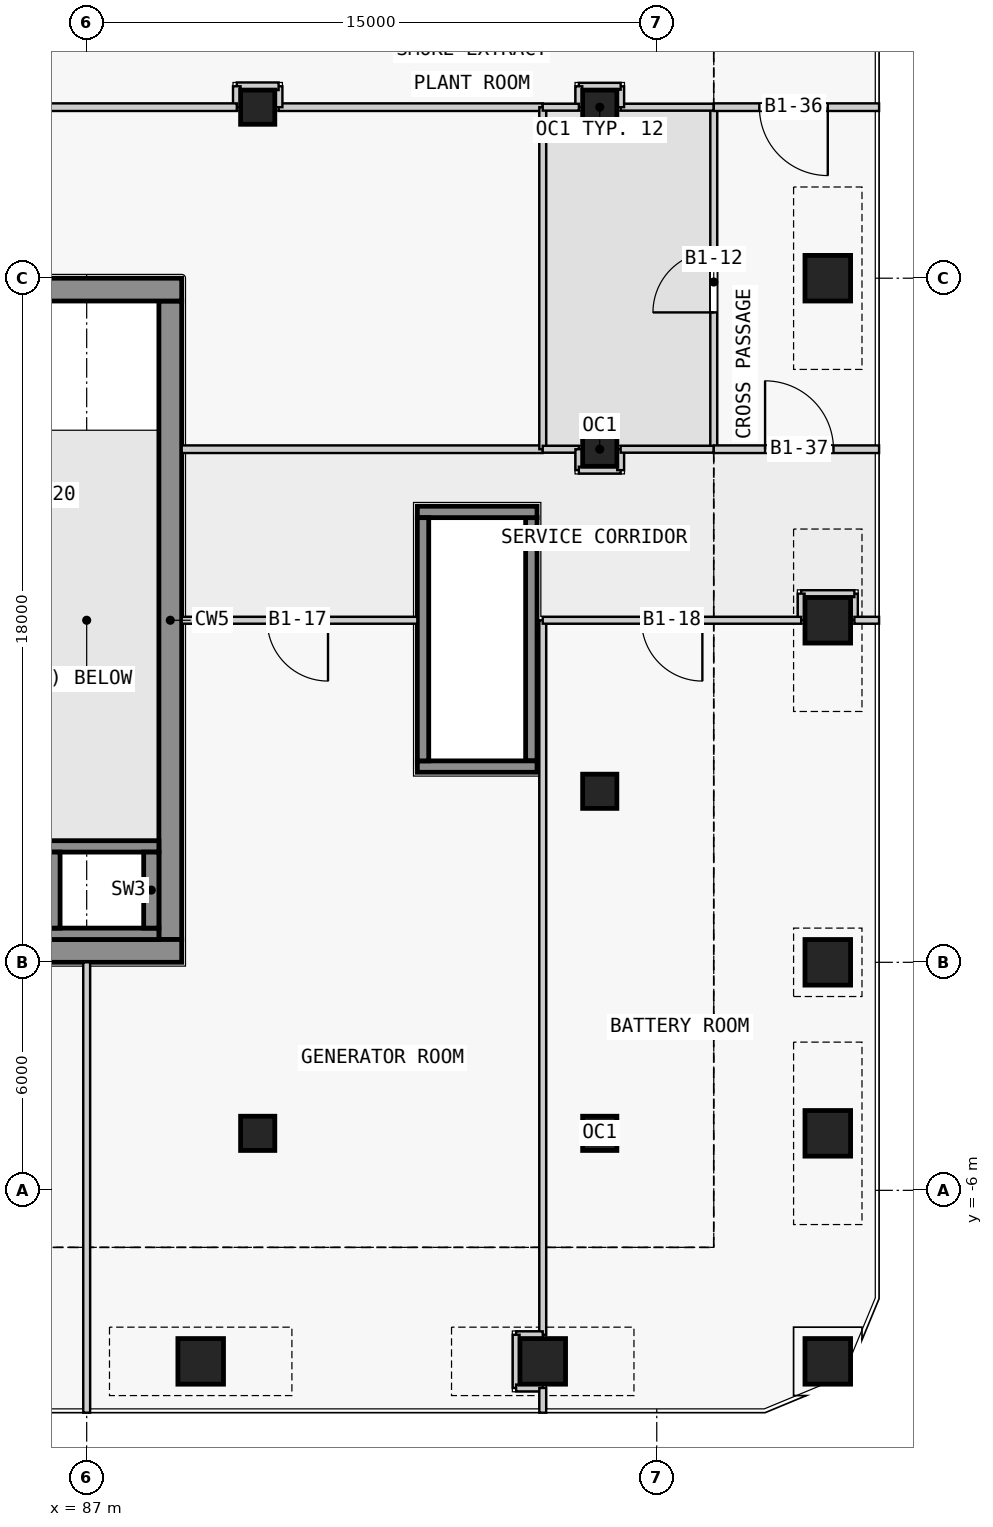
"""IFC4 building model, lengths in metres.
Left out: names, types, materials, properties, quantities, classifications, styles, units other than length and angle.
Written with IfcOpenShell. Run it as: python <this file> out.ifc"""

import sys

from ifc_helpers import new_model, si_unit, direction, frame, frame_2d, origin, origin_2d, place, context, subcontext, project, spatial, rectangle, extrude, element, fill, save


model = new_model("IFC4")
c1 = context("Model", 3, precision=1e-05, world=origin(), true_north=direction((0.0, 1.0)))
c2 = subcontext(c1, "Body", "Model", "MODEL_VIEW")
j1 = project(units=[si_unit("LENGTHUNIT", "METRE"), si_unit("PLANEANGLEUNIT", "RADIAN")], contexts=[c1])
p1 = place(None, origin())
s1 = spatial("IfcSite", under=j1, at=p1, CompositionType="ELEMENT")
p2 = place(p1, origin())
s2 = spatial("IfcBuilding", under=s1, at=p2, CompositionType="ELEMENT")
p3 = place(p2, frame((0.0, 0.0, -7.0)))
s3 = spatial("IfcBuildingStorey", under=s2, at=p3, CompositionType="ELEMENT", Elevation=-7.0)
for number, where, z_axis, x_axis in (
    (1, (90.0, -10.5, 0.0), (0.0, 0.0, 1.0), (1.0, 0.0, 0.0)),
    (2, (99.0, -10.5, 0.0), (0.0, 0.0, 1.0), (1.0, 0.0, 0.0)),
    (3, (106.5, -10.5, 0.0), (0.0, 0.0, 1.0), (1.0, 0.0, 0.0)),
    (4, (106.5, -4.5, 0.0), (0.0, 0.0, 1.0), (1.0, 0.0, 0.0)),
    (5, (106.5, 0.0, 0.0), (0.0, 0.0, 1.0), (1.0, 0.0, 0.0)),
    (6, (106.5, 9.0, 0.0), (0.0, 0.0, 1.0), (1.0, 0.0, 0.0)),
    (7, (106.5, 18.0, 0.0), (0.0, 0.0, 1.0), (1.0, 0.0, 0.0)),
):
    element("IfcColumn", number, at=place(p3, frame(where, z_axis=z_axis, x_axis=x_axis)), inside=s3, PredefinedType="COLUMN", context=c2, shape_type="SweptSolid", body=[
        extrude(rectangle(XDim=1.2, YDim=1.2, at=origin_2d()), origin(), (0.0, 0.0, 1.0), 7.0),
    ])
for number, where, z_axis, x_axis in (
    (8, (91.5, -4.5, 0.0), (0.0, 0.0, 1.0), (1.0, 0.0, 0.0)),
    (9, (100.5, -4.5, 0.0), (0.0, 0.0, 1.0), (1.0, 0.0, 0.0)),
    (10, (100.5, 4.5, 0.0), (0.0, 0.0, 1.0), (1.0, 0.0, 0.0)),
    (11, (100.5, 13.5, 0.0), (0.0, 0.0, 1.0), (1.0, 0.0, 0.0)),
    (12, (100.5, 22.5, 0.0), (0.0, 0.0, 1.0), (1.0, 0.0, 0.0)),
    (13, (91.5, 22.5, 0.0), (0.0, 0.0, 1.0), (1.0, 0.0, 0.0)),
):
    element("IfcColumn", number, at=place(p3, frame(where, z_axis=z_axis, x_axis=x_axis)), inside=s3, PredefinedType="COLUMN", context=c2, shape_type="SweptSolid", body=[
        extrude(rectangle(XDim=0.9, YDim=0.9, at=origin_2d()), origin(), (0.0, 0.0, 1.0), 7.0),
    ])
for number, where, z_axis, x_axis in (
    (14, (75.0, 0.3, 0.0), (0.0, 0.0, 1.0), (1.0, 0.0, 0.0)),
    (15, (75.0, 17.7, 0.0), (0.0, 0.0, 1.0), (1.0, 0.0, 0.0)),
):
    element("IfcWall", number, at=place(p3, frame(where, z_axis=z_axis, x_axis=x_axis)), inside=s3, PredefinedType="SHEAR", context=c2, shape_type="SweptSolid", body=[
        extrude(rectangle(XDim=14.5, YDim=0.6, at=frame_2d((7.25, 0.0))), origin(), (0.0, 0.0, 1.0), 6.55),
    ])
p4 = place(p3, frame((89.2, 0.6, 0.0), z_axis=(0.0, 0.0, 1.0), x_axis=(0.0, 1.0, 0.0)))
e16 = element("IfcWall", 16, at=p4, inside=s3, PredefinedType="SHEAR", context=c2, shape_type="SweptSolid", body=[
    extrude(rectangle(XDim=16.8, YDim=0.6, at=frame_2d((8.4, 0.0))), origin(), (0.0, 0.0, 1.0), 6.55),
])
p5 = place(p3, frame((81.3, 0.75, 0.0), z_axis=(0.0, 0.0, 1.0), x_axis=(1.0, 0.0, 0.0)))
e17 = element("IfcWall", 17, at=p5, inside=s3, PredefinedType="SHEAR", context=c2, shape_type="SweptSolid", body=[
    extrude(rectangle(XDim=7.6, YDim=0.3, at=frame_2d((3.8, 0.0))), origin(), (0.0, 0.0, 1.0), 6.55),
])
p6 = place(p3, frame((86.15, 0.9, 0.0), z_axis=(0.0, 0.0, 1.0), x_axis=(0.0, 1.0, 0.0)))
e18 = element("IfcWall", 18, at=p6, inside=s3, PredefinedType="SHEAR", context=c2, shape_type="SweptSolid", body=[
    extrude(rectangle(XDim=2.0, YDim=0.3, at=frame_2d((1.0, 0.0))), origin(), (0.0, 0.0, 1.0), 6.55),
])
p7 = place(p3, frame((88.7, 0.9, 0.0), z_axis=(0.0, 0.0, 1.0), x_axis=(0.0, 1.0, 0.0)))
e19 = element("IfcWall", 19, at=p7, inside=s3, PredefinedType="SHEAR", context=c2, shape_type="SweptSolid", body=[
    extrude(rectangle(XDim=2.0, YDim=0.4, at=frame_2d((1.0, 0.0))), origin(), (0.0, 0.0, 1.0), 6.55),
])
p8 = place(p3, frame((81.3, 3.05, 0.0), z_axis=(0.0, 0.0, 1.0), x_axis=(1.0, 0.0, 0.0)))
e20 = element("IfcWall", 20, at=p8, inside=s3, PredefinedType="SHEAR", context=c2, shape_type="SweptSolid", body=[
    extrude(rectangle(XDim=7.6, YDim=0.3, at=frame_2d((3.8, 0.0))), origin(), (0.0, 0.0, 1.0), 6.55),
])
for number, where, z_axis, x_axis in (
    (21, (95.85, 5.3, 0.0), (0.0, 0.0, 1.0), (0.0, 1.0, 0.0)),
    (22, (98.7, 5.3, 0.0), (0.0, 0.0, 1.0), (0.0, 1.0, 0.0)),
):
    element("IfcWall", number, at=place(p3, frame(where, z_axis=z_axis, x_axis=x_axis)), inside=s3, PredefinedType="SHEAR", context=c2, shape_type="SweptSolid", body=[
        extrude(rectangle(XDim=6.4, YDim=0.3, at=frame_2d((3.2, 0.0))), origin(), (0.0, 0.0, 1.0), 6.55),
    ])
for number, where, z_axis, x_axis in (
    (23, (95.7, 5.15, 0.0), (0.0, 0.0, 1.0), (1.0, 0.0, 0.0)),
    (24, (95.7, 11.85, 0.0), (0.0, 0.0, 1.0), (1.0, 0.0, 0.0)),
):
    element("IfcWall", number, at=place(p3, frame(where, z_axis=z_axis, x_axis=x_axis)), inside=s3, PredefinedType="SHEAR", context=c2, shape_type="SweptSolid", body=[
        extrude(rectangle(XDim=3.15, YDim=0.3, at=frame_2d((1.575, 0.0))), origin(), (0.0, 0.0, 1.0), 6.55),
    ])
p9 = place(p3, frame((99.0, 9.0, 0.0), z_axis=(0.0, 0.0, 1.0), x_axis=(0.0, -1.0, 0.0)))
e25 = element("IfcWall", 25, at=p9, inside=s3, PredefinedType="PARTITIONING", context=c2, shape_type="SweptSolid", body=[
    extrude(rectangle(XDim=18.8, YDim=0.18, at=frame_2d((9.4, 0.0))), origin(), (0.0, 0.0, 1.0), 6.55),
])
p10 = place(p3, frame((99.0, -9.8, 0.0), z_axis=(0.0, 0.0, 1.0), x_axis=(-1.0, 0.0, 0.0)))
e26 = element("IfcWall", 26, at=p10, inside=s3, PredefinedType="PARTITIONING", context=c2, shape_type="SweptSolid", body=[
    extrude(rectangle(XDim=0.7, YDim=0.18, at=frame_2d((0.35, 0.0))), origin(), (0.0, 0.0, 1.0), 6.55),
])
p11 = place(p3, frame((98.3, -9.8, 0.0), z_axis=(0.0, 0.0, 1.0), x_axis=(0.0, -1.0, 0.0)))
e27 = element("IfcWall", 27, at=p11, inside=s3, PredefinedType="PARTITIONING", context=c2, shape_type="SweptSolid", body=[
    extrude(rectangle(XDim=1.4, YDim=0.18, at=frame_2d((0.7, 0.0))), origin(), (0.0, 0.0, 1.0), 6.55),
])
p12 = place(p3, frame((98.3, -11.2, 0.0), z_axis=(0.0, 0.0, 1.0), x_axis=(1.0, 0.0, 0.0)))
e28 = element("IfcWall", 28, at=p12, inside=s3, PredefinedType="PARTITIONING", context=c2, shape_type="SweptSolid", body=[
    extrude(rectangle(XDim=0.7, YDim=0.18, at=frame_2d((0.35, 0.0))), origin(), (0.0, 0.0, 1.0), 6.55),
])
p13 = place(p3, frame((99.0, -11.2, 0.0), z_axis=(0.0, 0.0, 1.0), x_axis=(0.0, -1.0, 0.0)))
e29 = element("IfcWall", 29, at=p13, inside=s3, PredefinedType="PARTITIONING", context=c2, shape_type="SweptSolid", body=[
    extrude(rectangle(XDim=0.65, YDim=0.18, at=frame_2d((0.325, 0.0))), origin(), (0.0, 0.0, 1.0), 6.55),
])
p14 = place(p3, frame((99.0, 22.5, 0.0), z_axis=(0.0, 0.0, 1.0), x_axis=(-1.0, 0.0, 0.0)))
e30 = element("IfcWall", 30, at=p14, inside=s3, PredefinedType="PARTITIONING", context=c2, shape_type="SweptSolid", body=[
    extrude(rectangle(XDim=6.95, YDim=0.2, at=frame_2d((3.475, 0.0))), origin(), (0.0, 0.0, 1.0), 6.55),
])
p15 = place(p3, frame((92.05, 22.5, 0.0), z_axis=(0.0, 0.0, 1.0), x_axis=(0.0, 1.0, 0.0)))
e31 = element("IfcWall", 31, at=p15, inside=s3, PredefinedType="PARTITIONING", context=c2, shape_type="SweptSolid", body=[
    extrude(rectangle(XDim=0.55, YDim=0.2, at=frame_2d((0.275, 0.0))), origin(), (0.0, 0.0, 1.0), 6.55),
])
p16 = place(p3, frame((92.05, 23.05, 0.0), z_axis=(0.0, 0.0, 1.0), x_axis=(-1.0, 0.0, 0.0)))
e32 = element("IfcWall", 32, at=p16, inside=s3, PredefinedType="PARTITIONING", context=c2, shape_type="SweptSolid", body=[
    extrude(rectangle(XDim=1.1, YDim=0.2, at=frame_2d((0.55, 0.0))), origin(), (0.0, 0.0, 1.0), 6.55),
])
p17 = place(p3, frame((90.95, 23.05, 0.0), z_axis=(0.0, 0.0, 1.0), x_axis=(0.0, -1.0, 0.0)))
e33 = element("IfcWall", 33, at=p17, inside=s3, PredefinedType="PARTITIONING", context=c2, shape_type="SweptSolid", body=[
    extrude(rectangle(XDim=0.55, YDim=0.2, at=frame_2d((0.275, 0.0))), origin(), (0.0, 0.0, 1.0), 6.55),
])
p18 = place(p3, frame((90.95, 22.5, 0.0), z_axis=(0.0, 0.0, 1.0), x_axis=(-1.0, 0.0, 0.0)))
e34 = element("IfcWall", 34, at=p18, inside=s3, PredefinedType="PARTITIONING", context=c2, shape_type="SweptSolid", body=[
    extrude(rectangle(XDim=7.9, YDim=0.2, at=frame_2d((3.95, 0.0))), origin(), (0.0, 0.0, 1.0), 6.55),
])
p19 = place(p3, frame((87.0, 0.0, 0.0), z_axis=(0.0, 0.0, 1.0), x_axis=(0.0, -1.0, 0.0)))
e35 = element("IfcWall", 35, at=p19, inside=s3, PredefinedType="PARTITIONING", context=c2, shape_type="SweptSolid", body=[
    extrude(rectangle(XDim=11.85, YDim=0.18, at=frame_2d((5.925, 0.0))), origin(), (0.0, 0.0, 1.0), 6.55),
])
p20 = place(p3, frame((107.2, 9.0, 0.0), z_axis=(0.0, 0.0, 1.0), x_axis=(0.0, 1.0, 0.0)))
e36 = element("IfcWall", 36, at=p20, inside=s3, PredefinedType="PARTITIONING", context=c2, shape_type="SweptSolid", body=[
    extrude(rectangle(XDim=0.7, YDim=0.18, at=frame_2d((0.35, 0.0))), origin(), (0.0, 0.0, 1.0), 6.55),
])
p21 = place(p3, frame((107.2, 9.7, 0.0), z_axis=(0.0, 0.0, 1.0), x_axis=(-1.0, 0.0, 0.0)))
e37 = element("IfcWall", 37, at=p21, inside=s3, PredefinedType="PARTITIONING", context=c2, shape_type="SweptSolid", body=[
    extrude(rectangle(XDim=1.4, YDim=0.18, at=frame_2d((0.7, 0.0))), origin(), (0.0, 0.0, 1.0), 6.55),
])
p22 = place(p3, frame((105.8, 9.7, 0.0), z_axis=(0.0, 0.0, 1.0), x_axis=(0.0, -1.0, 0.0)))
e38 = element("IfcWall", 38, at=p22, inside=s3, PredefinedType="PARTITIONING", context=c2, shape_type="SweptSolid", body=[
    extrude(rectangle(XDim=0.7, YDim=0.18, at=frame_2d((0.35, 0.0))), origin(), (0.0, 0.0, 1.0), 6.55),
])
p23 = place(p3, frame((105.8, 9.0, 0.0), z_axis=(0.0, 0.0, 1.0), x_axis=(-1.0, 0.0, 0.0)))
e39 = element("IfcWall", 39, at=p23, inside=s3, PredefinedType="PARTITIONING", context=c2, shape_type="SweptSolid", body=[
    extrude(rectangle(XDim=6.8, YDim=0.18, at=frame_2d((3.4, 0.0))), origin(), (0.0, 0.0, 1.0), 6.55),
])
p24 = place(p23, frame((2.6, 0.0, 0.0)))
e40 = element("IfcOpeningElement", 40, at=p24, cuts=e39, PredefinedType="OPENING", context=c2, shape_type="SweptSolid", body=[
    extrude(rectangle(XDim=1.6, YDim=2.4, at=frame_2d((0.8, 1.2))), frame((0.0, 0.1, 0.0), z_axis=(0.0, -1.0, 0.0), x_axis=(1.0, 0.0, 0.0)), (0.0, 0.0, 1.0), 0.2),
])
p25 = place(p3, frame((89.5, 13.5, 0.0), z_axis=(0.0, 0.0, 1.0), x_axis=(1.0, 0.0, 0.0)))
e41 = element("IfcWall", 41, at=p25, inside=s3, PredefinedType="PARTITIONING", context=c2, shape_type="SweptSolid", body=[
    extrude(rectangle(XDim=9.5, YDim=0.2, at=frame_2d((4.75, 0.0))), origin(), (0.0, 0.0, 1.0), 6.55),
])
p26 = place(p3, frame((103.5, 13.5, 0.0), z_axis=(0.0, 0.0, 1.0), x_axis=(0.0, 1.0, 0.0)))
e42 = element("IfcWall", 42, at=p26, inside=s3, PredefinedType="PARTITIONING", context=c2, shape_type="SweptSolid", body=[
    extrude(rectangle(XDim=9.0, YDim=0.18, at=frame_2d((4.5, 0.0))), origin(), (0.0, 0.0, 1.0), 6.55),
])
p27 = place(p26, frame((3.6, 0.0, 0.0)))
e43 = element("IfcOpeningElement", 43, at=p27, cuts=e42, PredefinedType="OPENING", context=c2, shape_type="SweptSolid", body=[
    extrude(rectangle(XDim=1.6, YDim=2.4, at=frame_2d((0.8, 1.2))), frame((0.0, 0.1, 0.0), z_axis=(0.0, -1.0, 0.0), x_axis=(1.0, 0.0, 0.0)), (0.0, 0.0, 1.0), 0.2),
])
p28 = place(p3, frame((99.0, 22.5, 0.0), z_axis=(0.0, 0.0, 1.0), x_axis=(0.0, -1.0, 0.0)))
e44 = element("IfcWall", 44, at=p28, inside=s3, PredefinedType="PARTITIONING", context=c2, shape_type="SweptSolid", body=[
    extrude(rectangle(XDim=9.0, YDim=0.18, at=frame_2d((4.5, 0.0))), origin(), (0.0, 0.0, 1.0), 6.55),
])
p29 = place(p3, frame((95.7, 9.0, 0.0), z_axis=(0.0, 0.0, 1.0), x_axis=(-1.0, 0.0, 0.0)))
e45 = element("IfcWall", 45, at=p29, inside=s3, PredefinedType="PARTITIONING", context=c2, shape_type="SweptSolid", body=[
    extrude(rectangle(XDim=6.2, YDim=0.18, at=frame_2d((3.1, 0.0))), origin(), (0.0, 0.0, 1.0), 6.55),
])
p30 = place(p29, frame((2.35, 0.0, 0.0)))
e46 = element("IfcOpeningElement", 46, at=p30, cuts=e45, PredefinedType="OPENING", context=c2, shape_type="SweptSolid", body=[
    extrude(rectangle(XDim=1.6, YDim=2.4, at=frame_2d((0.8, 1.2))), frame((0.0, 0.1, 0.0), z_axis=(0.0, -1.0, 0.0), x_axis=(1.0, 0.0, 0.0)), (0.0, 0.0, 1.0), 0.2),
])
p31 = place(p3, frame((103.5, 22.5, 0.0), z_axis=(0.0, 0.0, 1.0), x_axis=(-1.0, 0.0, 0.0)))
e47 = element("IfcWall", 47, at=p31, inside=s3, PredefinedType="PARTITIONING", context=c2, shape_type="SweptSolid", body=[
    extrude(rectangle(XDim=2.45, YDim=0.18, at=frame_2d((1.225, 0.0))), origin(), (0.0, 0.0, 1.0), 6.55),
])
p32 = place(p3, frame((101.05, 22.5, 0.0), z_axis=(0.0, 0.0, 1.0), x_axis=(0.0, 1.0, 0.0)))
e48 = element("IfcWall", 48, at=p32, inside=s3, PredefinedType="PARTITIONING", context=c2, shape_type="SweptSolid", body=[
    extrude(rectangle(XDim=0.55, YDim=0.18, at=frame_2d((0.275, 0.0))), origin(), (0.0, 0.0, 1.0), 6.55),
])
p33 = place(p3, frame((101.05, 23.05, 0.0), z_axis=(0.0, 0.0, 1.0), x_axis=(-1.0, 0.0, 0.0)))
e49 = element("IfcWall", 49, at=p33, inside=s3, PredefinedType="PARTITIONING", context=c2, shape_type="SweptSolid", body=[
    extrude(rectangle(XDim=1.1, YDim=0.18, at=frame_2d((0.55, 0.0))), origin(), (0.0, 0.0, 1.0), 6.55),
])
p34 = place(p3, frame((99.95, 23.05, 0.0), z_axis=(0.0, 0.0, 1.0), x_axis=(0.0, -1.0, 0.0)))
e50 = element("IfcWall", 50, at=p34, inside=s3, PredefinedType="PARTITIONING", context=c2, shape_type="SweptSolid", body=[
    extrude(rectangle(XDim=0.55, YDim=0.18, at=frame_2d((0.275, 0.0))), origin(), (0.0, 0.0, 1.0), 6.55),
])
for number, where, z_axis, x_axis in (
    (51, (99.95, 22.5, 0.0), (0.0, 0.0, 1.0), (-1.0, 0.0, 0.0)),
    (52, (99.0, 13.5, 0.0), (0.0, 0.0, 1.0), (1.0, 0.0, 0.0)),
):
    element("IfcWall", number, at=place(p3, frame(where, z_axis=z_axis, x_axis=x_axis)), inside=s3, PredefinedType="PARTITIONING", context=c2, shape_type="SweptSolid", body=[
        extrude(rectangle(XDim=0.95, YDim=0.18, at=frame_2d((0.475, 0.0))), origin(), (0.0, 0.0, 1.0), 6.55),
    ])
p35 = place(p3, frame((99.95, 13.5, 0.0), z_axis=(0.0, 0.0, 1.0), x_axis=(0.0, -1.0, 0.0)))
e53 = element("IfcWall", 53, at=p35, inside=s3, PredefinedType="PARTITIONING", context=c2, shape_type="SweptSolid", body=[
    extrude(rectangle(XDim=0.55, YDim=0.18, at=frame_2d((0.275, 0.0))), origin(), (0.0, 0.0, 1.0), 6.55),
])
p36 = place(p3, frame((99.95, 12.95, 0.0), z_axis=(0.0, 0.0, 1.0), x_axis=(1.0, 0.0, 0.0)))
e54 = element("IfcWall", 54, at=p36, inside=s3, PredefinedType="PARTITIONING", context=c2, shape_type="SweptSolid", body=[
    extrude(rectangle(XDim=1.1, YDim=0.18, at=frame_2d((0.55, 0.0))), origin(), (0.0, 0.0, 1.0), 6.55),
])
p37 = place(p3, frame((101.05, 12.95, 0.0), z_axis=(0.0, 0.0, 1.0), x_axis=(0.0, 1.0, 0.0)))
e55 = element("IfcWall", 55, at=p37, inside=s3, PredefinedType="PARTITIONING", context=c2, shape_type="SweptSolid", body=[
    extrude(rectangle(XDim=0.55, YDim=0.18, at=frame_2d((0.275, 0.0))), origin(), (0.0, 0.0, 1.0), 6.55),
])
p38 = place(p3, frame((101.05, 13.5, 0.0), z_axis=(0.0, 0.0, 1.0), x_axis=(1.0, 0.0, 0.0)))
e56 = element("IfcWall", 56, at=p38, inside=s3, PredefinedType="PARTITIONING", context=c2, shape_type="SweptSolid", body=[
    extrude(rectangle(XDim=2.45, YDim=0.18, at=frame_2d((1.225, 0.0))), origin(), (0.0, 0.0, 1.0), 6.55),
])
p39 = place(p3, frame((107.85, 22.5, 0.0), z_axis=(0.0, 0.0, 1.0), x_axis=(-1.0, 0.0, 0.0)))
e57 = element("IfcWall", 57, at=p39, inside=s3, PredefinedType="PARTITIONING", context=c2, shape_type="SweptSolid", body=[
    extrude(rectangle(XDim=4.35, YDim=0.2, at=frame_2d((2.175, 0.0))), origin(), (0.0, 0.0, 1.0), 6.55),
])
p40 = place(p39, frame((1.35, 0.0, 0.0)))
e58 = element("IfcOpeningElement", 58, at=p40, cuts=e57, PredefinedType="OPENING", context=c2, shape_type="SweptSolid", body=[
    extrude(rectangle(XDim=1.8, YDim=2.1, at=frame_2d((0.9, 1.05))), frame((0.0, 0.11, 0.0), z_axis=(0.0, -1.0, 0.0), x_axis=(1.0, 0.0, 0.0)), (0.0, 0.0, 1.0), 0.22),
])
p41 = place(p3, frame((103.5, 13.5, 0.0), z_axis=(0.0, 0.0, 1.0), x_axis=(1.0, 0.0, 0.0)))
e59 = element("IfcWall", 59, at=p41, inside=s3, PredefinedType="PARTITIONING", context=c2, shape_type="SweptSolid", body=[
    extrude(rectangle(XDim=4.35, YDim=0.2, at=frame_2d((2.175, 0.0))), origin(), (0.0, 0.0, 1.0), 6.55),
])
p42 = place(p41, frame((1.35, 0.0, 0.0)))
e60 = element("IfcOpeningElement", 60, at=p42, cuts=e59, PredefinedType="OPENING", context=c2, shape_type="SweptSolid", body=[
    extrude(rectangle(XDim=1.8, YDim=2.1, at=frame_2d((0.9, 1.05))), frame((0.0, 0.11, 0.0), z_axis=(0.0, -1.0, 0.0), x_axis=(1.0, 0.0, 0.0)), (0.0, 0.0, 1.0), 0.22),
])
p43 = place(p3, frame((107.85, 9.0, 0.0), z_axis=(0.0, 0.0, 1.0), x_axis=(-1.0, 0.0, 0.0)))
e61 = element("IfcWall", 61, at=p43, inside=s3, PredefinedType="PARTITIONING", context=c2, shape_type="SweptSolid", body=[
    extrude(rectangle(XDim=0.65, YDim=0.18, at=frame_2d((0.325, 0.0))), origin(), (0.0, 0.0, 1.0), 6.55),
])
p44 = place(p27, origin())
e62 = element("IfcDoor", 62, at=p44, inside=s3, OperationType="SINGLE_SWING_LEFT", PredefinedType="DOOR", context=c2, shape_type="SweptSolid", body=[
    extrude(rectangle(XDim=1.6, YDim=2.4, at=frame_2d((0.8, 1.2))), frame((0.0, 0.025, 0.0), z_axis=(0.0, -1.0, 0.0), x_axis=(1.0, 0.0, 0.0)), (0.0, 0.0, 1.0), 0.05),
])
fill(e43, e62)
p45 = place(p30, origin())
e63 = element("IfcDoor", 63, at=p45, inside=s3, OperationType="SINGLE_SWING_LEFT", PredefinedType="DOOR", context=c2, shape_type="SweptSolid", body=[
    extrude(rectangle(XDim=1.6, YDim=2.4, at=frame_2d((0.8, 1.2))), frame((0.0, 0.025, 0.0), z_axis=(0.0, -1.0, 0.0), x_axis=(1.0, 0.0, 0.0)), (0.0, 0.0, 1.0), 0.05),
])
fill(e46, e63)
p46 = place(p24, origin())
e64 = element("IfcDoor", 64, at=p46, inside=s3, OperationType="SINGLE_SWING_LEFT", PredefinedType="DOOR", context=c2, shape_type="SweptSolid", body=[
    extrude(rectangle(XDim=1.6, YDim=2.4, at=frame_2d((0.8, 1.2))), frame((0.0, 0.025, 0.0), z_axis=(0.0, -1.0, 0.0), x_axis=(1.0, 0.0, 0.0)), (0.0, 0.0, 1.0), 0.05),
])
fill(e40, e64)
p47 = place(p40, origin())
e65 = element("IfcDoor", 65, at=p47, inside=s3, OperationType="DOUBLE_DOOR_SINGLE_SWING", PredefinedType="DOOR", context=c2, shape_type="SweptSolid", body=[
    extrude(rectangle(XDim=1.8, YDim=2.1, at=frame_2d((0.9, 1.05))), frame((0.0, 0.025, 0.0), z_axis=(0.0, -1.0, 0.0), x_axis=(1.0, 0.0, 0.0)), (0.0, 0.0, 1.0), 0.05),
])
fill(e58, e65)
p48 = place(p42, origin())
e66 = element("IfcDoor", 66, at=p48, inside=s3, OperationType="DOUBLE_DOOR_SINGLE_SWING", PredefinedType="DOOR", context=c2, shape_type="SweptSolid", body=[
    extrude(rectangle(XDim=1.8, YDim=2.1, at=frame_2d((0.9, 1.05))), frame((0.0, 0.025, 0.0), z_axis=(0.0, -1.0, 0.0), x_axis=(1.0, 0.0, 0.0)), (0.0, 0.0, 1.0), 0.05),
])
fill(e60, e66)
save(model, sys.argv[1])
